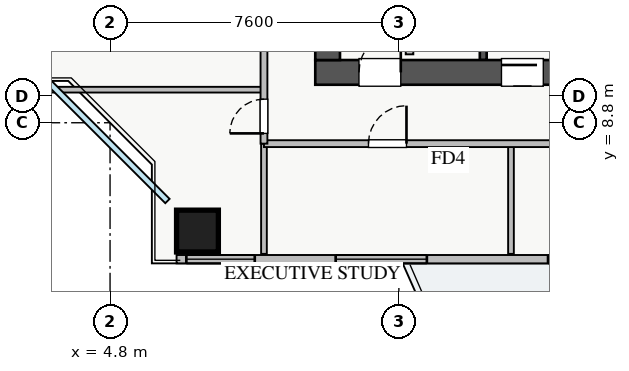
"""IFC4 building model, lengths in metres.
Left out: names, types, materials, properties, quantities, classifications, styles, units other than length and angle.
Written with IfcOpenShell. Run it as: python <this file> out.ifc"""

import sys

from ifc_helpers import new_model, si_unit, direction, frame, frame_2d, origin, origin_2d, place, context, subcontext, project, spatial, rectangle, extrude, source, transform, mapped, element, fill, save


model = new_model("IFC4")
c1 = context("Model", 3, precision=1e-05, world=origin(), true_north=direction((0.0, 1.0)))
c2 = subcontext(c1, "Body", "Model", "MODEL_VIEW")
j1 = project(units=[si_unit("LENGTHUNIT", "METRE"), si_unit("PLANEANGLEUNIT", "RADIAN")], contexts=[c1])
p1 = place(None, origin())
s1 = spatial("IfcSite", under=j1, at=p1, CompositionType="ELEMENT")
p2 = place(p1, origin())
s2 = spatial("IfcBuilding", under=s1, at=p2, CompositionType="ELEMENT")
p3 = place(p2, frame((0.0, 0.0, 113.25)))
s3 = spatial("IfcBuildingStorey", under=s2, at=p3, CompositionType="ELEMENT", Elevation=113.25)
p4 = place(p3, frame((14.62, 10.45, 0.0), z_axis=(0.0, 0.0, 1.0), x_axis=(0.0, 1.0, 0.0)))
e1 = element("IfcWall", 1, at=p4, inside=s3, PredefinedType="SHEAR", context=c2, shape_type="SweptSolid", body=[
    extrude(rectangle(XDim=2.35, YDim=0.18, at=frame_2d((1.175, 0.0))), origin(), (0.0, 0.0, 1.0), 3.07),
])
p5 = place(p3, frame((10.2, 10.125, 0.0), z_axis=(0.0, 0.0, 1.0), x_axis=(1.0, 0.0, 0.0)))
e2 = element("IfcWall", 2, at=p5, inside=s3, PredefinedType="SHEAR", context=c2, shape_type="SweptSolid", body=[
    extrude(rectangle(XDim=17.6, YDim=0.65, at=frame_2d((8.8, 0.0))), origin(), (0.0, 0.0, 1.0), 3.25),
])
p6 = place(p5, frame((1.15, 0.0, 0.0)))
e3 = element("IfcOpeningElement", 3, at=p6, cuts=e2, PredefinedType="OPENING", context=c2, shape_type="SweptSolid", body=[
    extrude(rectangle(XDim=1.1, YDim=2.05, at=frame_2d((0.55, 1.025))), frame((0.0, 0.335, 0.0), z_axis=(0.0, -1.0, 0.0), x_axis=(1.0, 0.0, 0.0)), (0.0, 0.0, 1.0), 0.67),
])
p7 = place(p5, frame((8.3, 0.0, 0.0)))
e4 = element("IfcOpeningElement", 4, at=p7, cuts=e2, PredefinedType="OPENING", context=c2, shape_type="SweptSolid", body=[
    extrude(rectangle(XDim=1.1, YDim=2.05, at=frame_2d((0.55, 1.025))), frame((0.0, 0.335, 0.0), z_axis=(0.0, -1.0, 0.0), x_axis=(1.0, 0.0, 0.0)), (0.0, 0.0, 1.0), 0.67),
])
p8 = place(p5, frame((4.9, 0.0, 0.0)))
e5 = element("IfcOpeningElement", 5, at=p8, cuts=e2, PredefinedType="OPENING", context=c2, shape_type="SweptSolid", body=[
    extrude(rectangle(XDim=1.1, YDim=2.05, at=frame_2d((0.55, 1.025))), frame((0.0, 0.335, 0.0), z_axis=(0.0, -1.0, 0.0), x_axis=(1.0, 0.0, 0.0)), (0.0, 0.0, 1.0), 0.67),
])
p9 = place(p5, frame((14.74, 0.0, 0.0)))
e6 = element("IfcOpeningElement", 6, at=p9, cuts=e2, PredefinedType="OPENING", context=c2, shape_type="SweptSolid", body=[
    extrude(rectangle(XDim=1.0, YDim=2.05, at=frame_2d((0.5, 1.025))), frame((0.0, 0.335, 0.0), z_axis=(0.0, -1.0, 0.0), x_axis=(1.0, 0.0, 0.0)), (0.0, 0.0, 1.0), 0.67),
])
p10 = place(p5, frame((10.155, 0.0, 0.0)))
e7 = element("IfcOpeningElement", 7, at=p10, cuts=e2, PredefinedType="OPENING", context=c2, shape_type="SweptSolid", body=[
    extrude(rectangle(XDim=1.0, YDim=2.05, at=frame_2d((0.5, 1.025))), frame((0.0, 0.335, 0.0), z_axis=(0.0, -1.0, 0.0), x_axis=(1.0, 0.0, 0.0)), (0.0, 0.0, 1.0), 0.67),
])
p11 = place(p5, frame((11.87, 0.0, 0.0)))
e8 = element("IfcOpeningElement", 8, at=p11, cuts=e2, PredefinedType="OPENING", context=c2, shape_type="SweptSolid", body=[
    extrude(rectangle(XDim=1.0, YDim=2.05, at=frame_2d((0.5, 1.025))), frame((0.0, 0.335, 0.0), z_axis=(0.0, -1.0, 0.0), x_axis=(1.0, 0.0, 0.0)), (0.0, 0.0, 1.0), 0.67),
])
p12 = place(p5, frame((13.46, 0.0, 0.0)))
e9 = element("IfcOpeningElement", 9, at=p12, cuts=e2, PredefinedType="OPENING", context=c2, shape_type="SweptSolid", body=[
    extrude(rectangle(XDim=1.0, YDim=2.05, at=frame_2d((0.5, 1.025))), frame((0.0, 0.335, 0.0), z_axis=(0.0, -1.0, 0.0), x_axis=(1.0, 0.0, 0.0)), (0.0, 0.0, 1.0), 0.67),
])
p13 = place(p3, frame((10.525, 10.45, 0.0), z_axis=(0.0, 0.0, 1.0), x_axis=(0.0, 1.0, 0.0)))
e10 = element("IfcWall", 10, at=p13, inside=s3, PredefinedType="SHEAR", context=c2, shape_type="SweptSolid", body=[
    extrude(rectangle(XDim=5.9, YDim=0.65, at=frame_2d((2.95, 0.0))), origin(), (0.0, 0.0, 1.0), 3.25),
])
m1 = source(origin(), c2, "Body", "SweptSolid", [
    extrude(rectangle(XDim=1.1, YDim=1.1, at=origin_2d()), origin(), (0.0, 0.0, 1.0), 3.25),
])
p14 = place(p3, frame((7.1, 5.95, 0.0), z_axis=(0.0, 0.0, 1.0), x_axis=(1.0, 0.0, 0.0)))
e11 = element("IfcColumn", 11, at=p14, inside=s3, PredefinedType="COLUMN", context=c2, shape_type="MappedRepresentation", body=[
    mapped(m1, transform((0.0, 0.0, 0.0), x_axis=(1.0, 0.0, 0.0), y_axis=(0.0, 1.0, 0.0), z_axis=(0.0, 0.0, 1.0), scale=1.0)),
])
p15 = place(p3, frame((6.55, 5.21, 0.0), z_axis=(0.0, 0.0, 1.0), x_axis=(1.0, 0.0, 0.0)))
e12 = element("IfcWall", 12, at=p15, inside=s3, PredefinedType="STANDARD", context=c2, shape_type="SweptSolid", body=[
    extrude(rectangle(XDim=24.9, YDim=0.22, at=frame_2d((12.45, 0.0))), origin(), (0.0, 0.0, 1.0), 2.61),
])
p16 = place(p15, frame((13.3, 0.0, 0.0)))
e13 = element("IfcOpeningElement", 13, at=p16, cuts=e12, PredefinedType="OPENING", context=c2, shape_type="SweptSolid", body=[
    extrude(rectangle(XDim=1.2, YDim=2.1, at=frame_2d((0.6, 1.05))), frame((0.0, 0.12, 0.0), z_axis=(0.0, -1.0, 0.0), x_axis=(1.0, 0.0, 0.0)), (0.0, 0.0, 1.0), 0.24),
])
p17 = place(p15, frame((0.258, 0.0, 0.9)))
e14 = element("IfcOpeningElement", 14, at=p17, cuts=e12, PredefinedType="OPENING", context=c2, shape_type="SweptSolid", body=[
    extrude(rectangle(XDim=1.8, YDim=1.5, at=frame_2d((0.9, 0.75))), frame((0.0, 0.12, 0.0), z_axis=(0.0, -1.0, 0.0), x_axis=(1.0, 0.0, 0.0)), (0.0, 0.0, 1.0), 0.24),
])
p18 = place(p15, frame((9.775, 0.0, 0.9)))
e15 = element("IfcOpeningElement", 15, at=p18, cuts=e12, PredefinedType="OPENING", context=c2, shape_type="SweptSolid", body=[
    extrude(rectangle(XDim=1.8, YDim=1.5, at=frame_2d((0.9, 0.75))), frame((0.0, 0.12, 0.0), z_axis=(0.0, -1.0, 0.0), x_axis=(1.0, 0.0, 0.0)), (0.0, 0.0, 1.0), 0.24),
])
p19 = place(p15, frame((14.813, 0.0, 0.9)))
e16 = element("IfcOpeningElement", 16, at=p19, cuts=e12, PredefinedType="OPENING", context=c2, shape_type="SweptSolid", body=[
    extrude(rectangle(XDim=1.5, YDim=1.45, at=frame_2d((0.75, 0.725))), frame((0.0, 0.12, 0.0), z_axis=(0.0, -1.0, 0.0), x_axis=(1.0, 0.0, 0.0)), (0.0, 0.0, 1.0), 0.24),
])
p20 = place(p15, frame((20.738, 0.0, 0.9)))
e17 = element("IfcOpeningElement", 17, at=p20, cuts=e12, PredefinedType="OPENING", context=c2, shape_type="SweptSolid", body=[
    extrude(rectangle(XDim=2.1, YDim=1.48, at=frame_2d((1.05, 0.74))), frame((0.0, 0.12, 0.0), z_axis=(0.0, -1.0, 0.0), x_axis=(1.0, 0.0, 0.0)), (0.0, 0.0, 1.0), 0.24),
])
p21 = place(p15, frame((4.187, 0.0, 0.9)))
e18 = element("IfcOpeningElement", 18, at=p21, cuts=e12, PredefinedType="OPENING", context=c2, shape_type="SweptSolid", body=[
    extrude(rectangle(XDim=2.4, YDim=1.5, at=frame_2d((1.2, 0.75))), frame((0.0, 0.12, 0.0), z_axis=(0.0, -1.0, 0.0), x_axis=(1.0, 0.0, 0.0)), (0.0, 0.0, 1.0), 0.24),
])
p22 = place(p3, frame((12.68, 10.6, 0.0), z_axis=(0.0, 0.0, 1.0), x_axis=(0.0, 1.0, 0.0)))
e19 = element("IfcWall", 19, at=p22, inside=s3, PredefinedType="PARTITIONING", context=c2, shape_type="SweptSolid", body=[
    extrude(rectangle(XDim=2.21, YDim=0.2, at=frame_2d((1.105, 0.0))), origin(), (0.0, 0.0, 1.0), 3.07),
])
for number, where, z_axis, x_axis in (
    (20, (15.35, 5.35, 0.0), (0.0, 0.0, 1.0), (0.0, 1.0, 0.0)),
    (21, (8.85, 5.35, 0.0), (0.0, 0.0, 1.0), (0.0, 1.0, 0.0)),
):
    element("IfcWall", number, at=place(p3, frame(where, z_axis=z_axis, x_axis=x_axis)), inside=s3, PredefinedType="PARTITIONING", context=c2, shape_type="SweptSolid", body=[
        extrude(rectangle(XDim=2.9, YDim=0.15, at=frame_2d((1.45, 0.0))), origin(), (0.0, 0.0, 1.0), 3.07),
    ])
p23 = place(p3, frame((8.85, 8.25, 0.0), z_axis=(0.0, 0.0, 1.0), x_axis=(1.0, 0.0, 0.0)))
e22 = element("IfcWall", 22, at=p23, inside=s3, PredefinedType="PARTITIONING", context=c2, shape_type="SweptSolid", body=[
    extrude(rectangle(XDim=23.57, YDim=0.18, at=frame_2d((11.785, 0.0))), origin(), (0.0, 0.0, 1.0), 3.07),
])
p24 = place(p23, frame((2.75, 0.0, 0.0)))
e23 = element("IfcOpeningElement", 23, at=p24, cuts=e22, PredefinedType="OPENING", context=c2, shape_type="SweptSolid", body=[
    extrude(rectangle(XDim=1.0, YDim=2.05, at=frame_2d((0.5, 1.025))), frame((0.0, 0.1, 0.0), z_axis=(0.0, -1.0, 0.0), x_axis=(1.0, 0.0, 0.0)), (0.0, 0.0, 1.0), 0.2),
])
p25 = place(p23, frame((7.875, 0.0, 0.0)))
e24 = element("IfcOpeningElement", 24, at=p25, cuts=e22, PredefinedType="OPENING", context=c2, shape_type="SweptSolid", body=[
    extrude(rectangle(XDim=1.0, YDim=2.05, at=frame_2d((0.5, 1.025))), frame((0.0, 0.1, 0.0), z_axis=(0.0, -1.0, 0.0), x_axis=(1.0, 0.0, 0.0)), (0.0, 0.0, 1.0), 0.2),
])
p26 = place(p23, frame((13.3, 0.0, 0.0)))
e25 = element("IfcOpeningElement", 25, at=p26, cuts=e22, PredefinedType="OPENING", context=c2, shape_type="SweptSolid", body=[
    extrude(rectangle(XDim=1.0, YDim=2.05, at=frame_2d((0.5, 1.025))), frame((0.0, 0.1, 0.0), z_axis=(0.0, -1.0, 0.0), x_axis=(1.0, 0.0, 0.0)), (0.0, 0.0, 1.0), 0.2),
])
p27 = place(p23, frame((19.74, 0.0, 0.0)))
e26 = element("IfcOpeningElement", 26, at=p27, cuts=e22, PredefinedType="OPENING", context=c2, shape_type="SweptSolid", body=[
    extrude(rectangle(XDim=1.0, YDim=2.05, at=frame_2d((0.5, 1.025))), frame((0.0, 0.1, 0.0), z_axis=(0.0, -1.0, 0.0), x_axis=(1.0, 0.0, 0.0)), (0.0, 0.0, 1.0), 0.2),
])
p28 = place(p3, frame((1.35, 9.67, 0.0), z_axis=(0.0, 0.0, 1.0), x_axis=(1.0, 0.0, 0.0)))
e27 = element("IfcWall", 27, at=p28, inside=s3, PredefinedType="PARTITIONING", context=c2, shape_type="SweptSolid", body=[
    extrude(rectangle(XDim=7.5, YDim=0.15, at=frame_2d((3.75, 0.0))), origin(), (0.0, 0.0, 1.0), 3.07),
])
p29 = place(p3, frame((8.85, 8.25, 0.0), z_axis=(0.0, 0.0, 1.0), x_axis=(0.0, 1.0, 0.0)))
e28 = element("IfcWall", 28, at=p29, inside=s3, PredefinedType="PARTITIONING", context=c2, shape_type="SweptSolid", body=[
    extrude(rectangle(XDim=29.5, YDim=0.18, at=frame_2d((14.75, 0.0))), origin(), (0.0, 0.0, 1.0), 3.07),
])
p30 = place(p29, frame((28.155, 0.0, 0.0)))
e29 = element("IfcOpeningElement", 29, at=p30, cuts=e28, PredefinedType="OPENING", context=c2, shape_type="SweptSolid", body=[
    extrude(rectangle(XDim=0.9, YDim=2.05, at=frame_2d((0.45, 1.025))), frame((0.0, 0.1, 0.0), z_axis=(0.0, -1.0, 0.0), x_axis=(1.0, 0.0, 0.0)), (0.0, 0.0, 1.0), 0.2),
])
p31 = place(p29, frame((0.27, 0.0, 0.0)))
e30 = element("IfcOpeningElement", 30, at=p31, cuts=e28, PredefinedType="OPENING", context=c2, shape_type="SweptSolid", body=[
    extrude(rectangle(XDim=0.9, YDim=2.05, at=frame_2d((0.45, 1.025))), frame((0.0, 0.1, 0.0), z_axis=(0.0, -1.0, 0.0), x_axis=(1.0, 0.0, 0.0)), (0.0, 0.0, 1.0), 0.2),
])
p32 = place(p29, frame((7.255, 0.0, 0.0)))
e31 = element("IfcOpeningElement", 31, at=p32, cuts=e28, PredefinedType="OPENING", context=c2, shape_type="SweptSolid", body=[
    extrude(rectangle(XDim=1.0, YDim=2.05, at=frame_2d((0.5, 1.025))), frame((0.0, 0.1, 0.0), z_axis=(0.0, -1.0, 0.0), x_axis=(1.0, 0.0, 0.0)), (0.0, 0.0, 1.0), 0.2),
])
p33 = place(p29, frame((16.675, 0.0, 0.0)))
e32 = element("IfcOpeningElement", 32, at=p33, cuts=e28, PredefinedType="OPENING", context=c2, shape_type="SweptSolid", body=[
    extrude(rectangle(XDim=1.0, YDim=2.05, at=frame_2d((0.5, 1.025))), frame((0.0, 0.1, 0.0), z_axis=(0.0, -1.0, 0.0), x_axis=(1.0, 0.0, 0.0)), (0.0, 0.0, 1.0), 0.2),
])
m2 = source(origin(), c2, "Body", "SweptSolid", [
    extrude(rectangle(XDim=1.8, YDim=1.5, at=frame_2d((0.9, 0.75))), frame((0.0, 0.03, 0.0), z_axis=(0.0, -1.0, 0.0), x_axis=(1.0, 0.0, 0.0)), (0.0, 0.0, 1.0), 0.06),
])
p34 = place(p17, origin())
e33 = element("IfcWindow", 33, at=p34, inside=s3, PartitioningType="TRIPLE_PANEL_VERTICAL", PredefinedType="WINDOW", context=c2, shape_type="MappedRepresentation", body=[
    mapped(m2, transform((0.0, 0.0, 0.0), x_axis=(1.0, 0.0, 0.0), y_axis=(0.0, 1.0, 0.0), z_axis=(0.0, 0.0, 1.0), scale=1.0)),
])
fill(e14, e33)
p35 = place(p18, origin())
e34 = element("IfcWindow", 34, at=p35, inside=s3, PartitioningType="DOUBLE_PANEL_VERTICAL", PredefinedType="WINDOW", context=c2, shape_type="MappedRepresentation", body=[
    mapped(m2, transform((0.0, 0.0, 0.0), x_axis=(1.0, 0.0, 0.0), y_axis=(0.0, 1.0, 0.0), z_axis=(0.0, 0.0, 1.0), scale=1.0)),
])
fill(e15, e34)
m3 = source(origin(), c2, "Body", "SweptSolid", [
    extrude(rectangle(XDim=1.1, YDim=2.05, at=frame_2d((0.55, 1.025))), frame((0.0, 0.025, 0.0), z_axis=(0.0, -1.0, 0.0), x_axis=(1.0, 0.0, 0.0)), (0.0, 0.0, 1.0), 0.05),
])
p36 = place(p6, origin())
e35 = element("IfcDoor", 35, at=p36, inside=s3, OperationType="SINGLE_SWING_RIGHT", PredefinedType="DOOR", context=c2, shape_type="MappedRepresentation", body=[
    mapped(m3, transform((0.0, 0.0, 0.0), x_axis=(1.0, 0.0, 0.0), y_axis=(0.0, 1.0, 0.0), z_axis=(0.0, 0.0, 1.0), scale=1.0)),
])
fill(e3, e35)
p37 = place(p8, origin())
e36 = element("IfcDoor", 36, at=p37, inside=s3, OperationType="SLIDING_TO_RIGHT", PredefinedType="DOOR", context=c2, shape_type="MappedRepresentation", body=[
    mapped(m3, transform((0.0, 0.0, 0.0), x_axis=(1.0, 0.0, 0.0), y_axis=(0.0, 1.0, 0.0), z_axis=(0.0, 0.0, 1.0), scale=1.0)),
])
fill(e5, e36)
m4 = source(origin(), c2, "Body", "SweptSolid", [
    extrude(rectangle(XDim=1.0, YDim=2.05, at=frame_2d((0.5, 1.025))), frame((0.0, 0.025, 0.0), z_axis=(0.0, -1.0, 0.0), x_axis=(1.0, 0.0, 0.0)), (0.0, 0.0, 1.0), 0.05),
])
p38 = place(p24, origin())
e37 = element("IfcDoor", 37, at=p38, inside=s3, OperationType="SINGLE_SWING_RIGHT", PredefinedType="DOOR", context=c2, shape_type="MappedRepresentation", body=[
    mapped(m4, transform((0.0, 0.0, 0.0), x_axis=(1.0, 0.0, 0.0), y_axis=(0.0, 1.0, 0.0), z_axis=(0.0, 0.0, 1.0), scale=1.0)),
])
fill(e23, e37)
m5 = source(origin(), c2, "Body", "SweptSolid", [
    extrude(rectangle(XDim=0.9, YDim=2.05, at=frame_2d((0.45, 1.025))), frame((0.0, 0.025, 0.0), z_axis=(0.0, -1.0, 0.0), x_axis=(1.0, 0.0, 0.0)), (0.0, 0.0, 1.0), 0.05),
])
p39 = place(p31, origin())
e38 = element("IfcDoor", 38, at=p39, inside=s3, OperationType="SINGLE_SWING_LEFT", PredefinedType="DOOR", context=c2, shape_type="MappedRepresentation", body=[
    mapped(m5, transform((0.0, 0.0, 0.0), x_axis=(1.0, 0.0, 0.0), y_axis=(0.0, 1.0, 0.0), z_axis=(0.0, 0.0, 1.0), scale=1.0)),
])
fill(e30, e38)
m6 = source(origin(), c2, "Body", "SweptSolid", [
    extrude(rectangle(XDim=2.4, YDim=1.5, at=frame_2d((1.2, 0.75))), frame((0.0, 0.03, 0.0), z_axis=(0.0, -1.0, 0.0), x_axis=(1.0, 0.0, 0.0)), (0.0, 0.0, 1.0), 0.06),
])
p40 = place(p21, origin())
e39 = element("IfcWindow", 39, at=p40, inside=s3, PartitioningType="TRIPLE_PANEL_VERTICAL", PredefinedType="WINDOW", context=c2, shape_type="MappedRepresentation", body=[
    mapped(m6, transform((0.0, 0.0, 0.0), x_axis=(1.0, 0.0, 0.0), y_axis=(0.0, 1.0, 0.0), z_axis=(0.0, 0.0, 1.0), scale=1.0)),
])
fill(e18, e39)
save(model, sys.argv[1])
